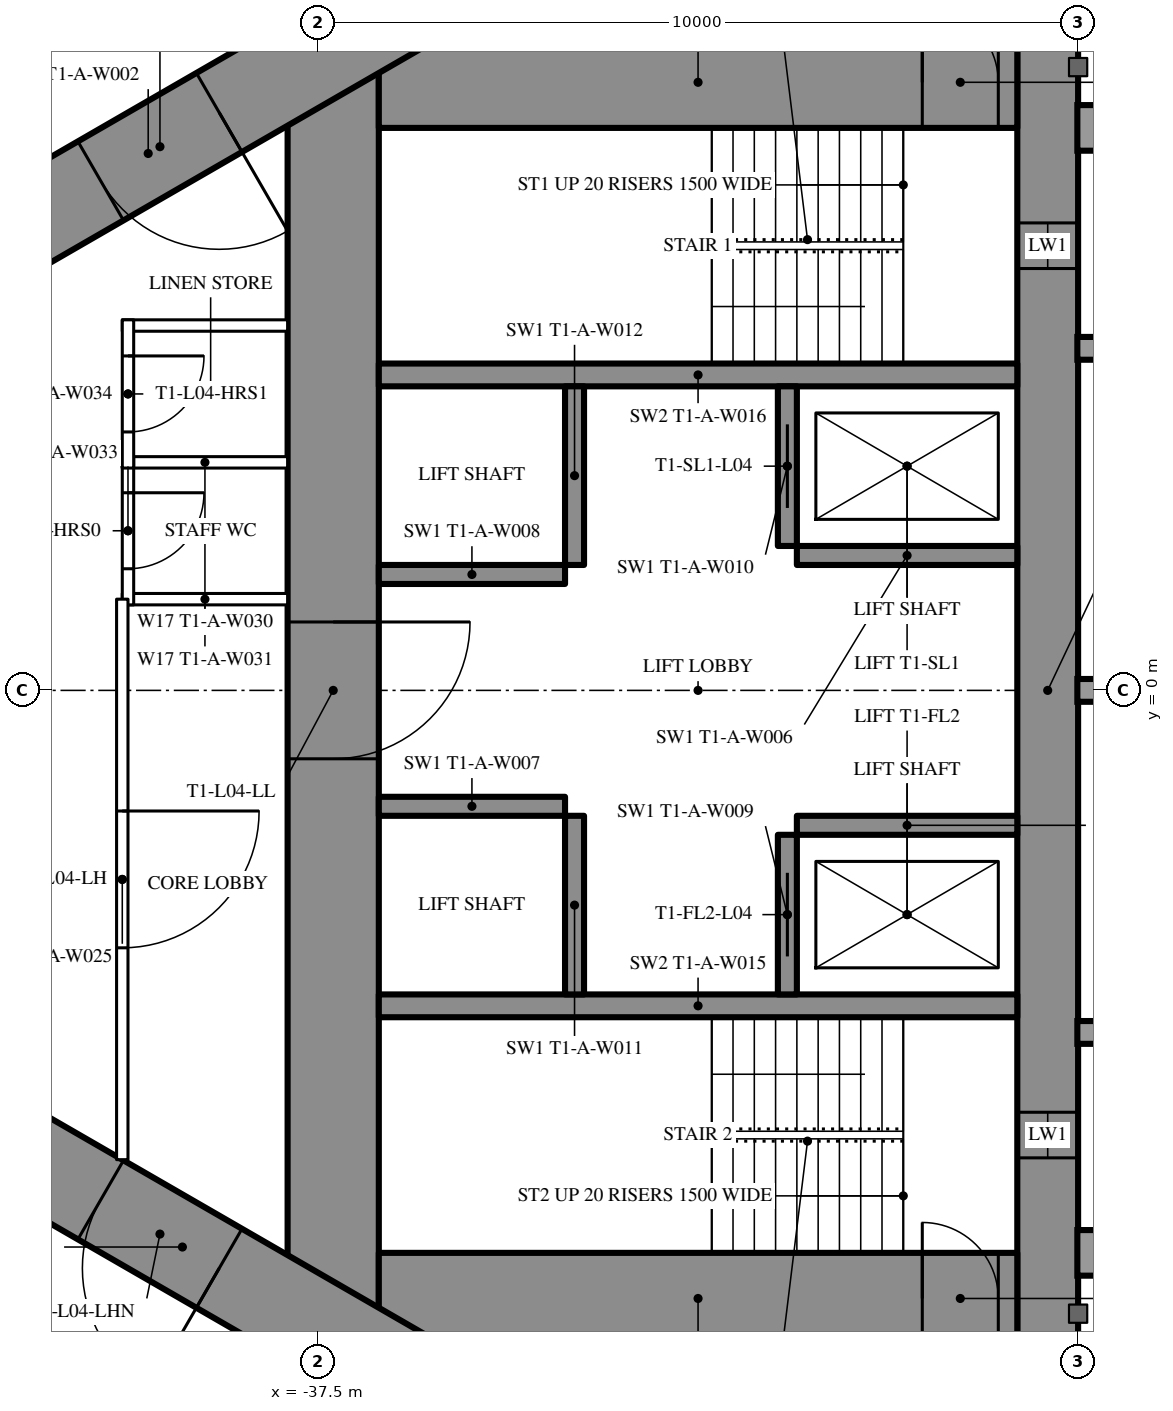
"""IFC4 building model, lengths in metres.
Left out: names, types, materials, properties, quantities, classifications, styles, units other than length and angle.
Written with IfcOpenShell. Run it as: python <this file> out.ifc"""

import sys

from ifc_helpers import new_model, si_unit, direction, frame, frame_2d, origin, place, context, subcontext, project, spatial, rectangle, extrude, element, fill, save


model = new_model("IFC4")
c1 = context("Model", 3, precision=1e-05, world=origin(), true_north=direction((0.0, 1.0)))
c2 = subcontext(c1, "Body", "Model", "MODEL_VIEW")
j1 = project(units=[si_unit("LENGTHUNIT", "METRE"), si_unit("PLANEANGLEUNIT", "RADIAN")], contexts=[c1])
p1 = place(None, origin())
s1 = spatial("IfcSite", under=j1, at=p1, CompositionType="ELEMENT")
p2 = place(p1, origin())
s2 = spatial("IfcBuilding", under=s1, at=p2, CompositionType="ELEMENT")
p3 = place(p2, frame((0.0, 0.0, 21.5)))
s3 = spatial("IfcBuildingStorey", under=s2, at=p3, CompositionType="ELEMENT", Elevation=21.5)
p4 = place(p3, frame((-27.9, 8.6, 0.0), z_axis=(0.0, 0.0, 1.0), x_axis=(0.0, -1.0, 0.0)))
e1 = element("IfcWall", 1, at=p4, inside=s3, PredefinedType="SHEAR", context=c2, shape_type="SweptSolid", body=[
    extrude(rectangle(XDim=17.2, YDim=0.8, at=frame_2d((8.6, 0.0))), origin(), (0.0, 0.0, 1.0), 3.5),
])
p5 = place(p4, frame((2.45, 0.0, 0.6)))
e2 = element("IfcOpeningElement", 2, at=p5, cuts=e1, PredefinedType="OPENING", context=c2, shape_type="SweptSolid", body=[
    extrude(rectangle(XDim=0.6, YDim=2.1, at=frame_2d((0.3, 1.05))), frame((0.0, 0.41, 0.0), z_axis=(0.0, -1.0, 0.0), x_axis=(1.0, 0.0, 0.0)), (0.0, 0.0, 1.0), 0.82),
])
p6 = place(p4, frame((14.15, 0.0, 0.6)))
e3 = element("IfcOpeningElement", 3, at=p6, cuts=e1, PredefinedType="OPENING", context=c2, shape_type="SweptSolid", body=[
    extrude(rectangle(XDim=0.6, YDim=2.1, at=frame_2d((0.3, 1.05))), frame((0.0, 0.41, 0.0), z_axis=(0.0, -1.0, 0.0), x_axis=(1.0, 0.0, 0.0)), (0.0, 0.0, 1.0), 0.82),
])
p7 = place(p3, frame((-37.3, 8.6, 0.0), z_axis=(0.0, 0.0, 1.0), x_axis=(0.0, -1.0, 0.0)))
e4 = element("IfcWall", 4, at=p7, inside=s3, PredefinedType="SHEAR", context=c2, shape_type="SweptSolid", body=[
    extrude(rectangle(XDim=17.2, YDim=1.2, at=frame_2d((8.6, 0.0))), origin(), (0.0, 0.0, 1.0), 3.5),
])
p8 = place(p7, frame((7.7, 0.0, 0.0)))
e5 = element("IfcOpeningElement", 5, at=p8, cuts=e4, PredefinedType="OPENING", context=c2, shape_type="SweptSolid", body=[
    extrude(rectangle(XDim=1.8, YDim=2.2, at=frame_2d((0.9, 1.1))), frame((0.0, 0.61, 0.0), z_axis=(0.0, -1.0, 0.0), x_axis=(1.0, 0.0, 0.0)), (0.0, 0.0, 1.0), 1.22),
])
p9 = place(p3, frame((-28.3, 8.0, 0.0), z_axis=(0.0, 0.0, 1.0), x_axis=(-1.0, 0.0, 0.0)))
e6 = element("IfcWall", 6, at=p9, inside=s3, PredefinedType="SHEAR", context=c2, shape_type="SweptSolid", body=[
    extrude(rectangle(XDim=8.4, YDim=1.2, at=frame_2d((4.2, 0.0))), origin(), (0.0, 0.0, 1.0), 3.5),
])
p10 = place(p9, frame((0.25, 0.0, 0.0)))
e7 = element("IfcOpeningElement", 7, at=p10, cuts=e6, PredefinedType="OPENING", context=c2, shape_type="SweptSolid", body=[
    extrude(rectangle(XDim=1.0, YDim=2.2, at=frame_2d((0.5, 1.1))), frame((0.0, 0.61, 0.0), z_axis=(0.0, -1.0, 0.0), x_axis=(1.0, 0.0, 0.0)), (0.0, 0.0, 1.0), 1.22),
])
p11 = place(p3, frame((-28.3, -8.0, 0.0), z_axis=(0.0, 0.0, 1.0), x_axis=(-1.0, 0.0, 0.0)))
e8 = element("IfcWall", 8, at=p11, inside=s3, PredefinedType="SHEAR", context=c2, shape_type="SweptSolid", body=[
    extrude(rectangle(XDim=8.4, YDim=1.2, at=frame_2d((4.2, 0.0))), origin(), (0.0, 0.0, 1.0), 3.5),
])
p12 = place(p11, frame((0.25, 0.0, 0.0)))
e9 = element("IfcOpeningElement", 9, at=p12, cuts=e8, PredefinedType="OPENING", context=c2, shape_type="SweptSolid", body=[
    extrude(rectangle(XDim=1.0, YDim=2.2, at=frame_2d((0.5, 1.1))), frame((0.0, 0.61, 0.0), z_axis=(0.0, -1.0, 0.0), x_axis=(1.0, 0.0, 0.0)), (0.0, 0.0, 1.0), 1.22),
])
for number, where, z_axis, x_axis in (
    (10, (-28.3, 4.15, 0.0), (0.0, 0.0, 1.0), (-1.0, 0.0, 0.0)),
    (11, (-28.3, -4.15, 0.0), (0.0, 0.0, 1.0), (-1.0, 0.0, 0.0)),
):
    element("IfcWall", number, at=place(p3, frame(where, z_axis=z_axis, x_axis=x_axis)), inside=s3, PredefinedType="SHEAR", context=c2, shape_type="SweptSolid", body=[
        extrude(rectangle(XDim=8.4, YDim=0.3, at=frame_2d((4.2, 0.0))), origin(), (0.0, 0.0, 1.0), 3.5),
    ])
p13 = place(p3, frame((-31.325, 4.0, 0.0), z_axis=(0.0, 0.0, 1.0), x_axis=(0.0, -1.0, 0.0)))
e12 = element("IfcWall", 12, at=p13, inside=s3, PredefinedType="SHEAR", context=c2, shape_type="SweptSolid", body=[
    extrude(rectangle(XDim=2.1, YDim=0.25, at=frame_2d((1.05, 0.0))), origin(), (0.0, 0.0, 1.0), 3.5),
])
p14 = place(p13, frame((0.5, 0.0, 0.0)))
e13 = element("IfcOpeningElement", 13, at=p14, cuts=e12, PredefinedType="OPENING", context=c2, shape_type="SweptSolid", body=[
    extrude(rectangle(XDim=1.1, YDim=2.2, at=frame_2d((0.55, 1.1))), frame((0.0, 0.135, 0.0), z_axis=(0.0, -1.0, 0.0), x_axis=(1.0, 0.0, 0.0)), (0.0, 0.0, 1.0), 0.27),
])
p15 = place(p3, frame((-34.125, 4.0, 0.0), z_axis=(0.0, 0.0, 1.0), x_axis=(0.0, -1.0, 0.0)))
e14 = element("IfcWall", 14, at=p15, inside=s3, PredefinedType="SHEAR", context=c2, shape_type="SweptSolid", body=[
    extrude(rectangle(XDim=2.35, YDim=0.25, at=frame_2d((1.175, 0.0))), origin(), (0.0, 0.0, 1.0), 3.5),
])
p16 = place(p3, frame((-28.3, 1.775, 0.0), z_axis=(0.0, 0.0, 1.0), x_axis=(-1.0, 0.0, 0.0)))
e15 = element("IfcWall", 15, at=p16, inside=s3, PredefinedType="SHEAR", context=c2, shape_type="SweptSolid", body=[
    extrude(rectangle(XDim=2.9, YDim=0.25, at=frame_2d((1.45, 0.0))), origin(), (0.0, 0.0, 1.0), 3.5),
])
p17 = place(p3, frame((-34.25, 1.525, 0.0), z_axis=(0.0, 0.0, 1.0), x_axis=(-1.0, 0.0, 0.0)))
e16 = element("IfcWall", 16, at=p17, inside=s3, PredefinedType="SHEAR", context=c2, shape_type="SweptSolid", body=[
    extrude(rectangle(XDim=2.45, YDim=0.25, at=frame_2d((1.225, 0.0))), origin(), (0.0, 0.0, 1.0), 3.5),
])
p18 = place(p3, frame((-31.325, -1.9, 0.0), z_axis=(0.0, 0.0, 1.0), x_axis=(0.0, -1.0, 0.0)))
e17 = element("IfcWall", 17, at=p18, inside=s3, PredefinedType="SHEAR", context=c2, shape_type="SweptSolid", body=[
    extrude(rectangle(XDim=2.1, YDim=0.25, at=frame_2d((1.05, 0.0))), origin(), (0.0, 0.0, 1.0), 3.5),
])
p19 = place(p18, frame((0.5, 0.0, 0.0)))
e18 = element("IfcOpeningElement", 18, at=p19, cuts=e17, PredefinedType="OPENING", context=c2, shape_type="SweptSolid", body=[
    extrude(rectangle(XDim=1.1, YDim=2.2, at=frame_2d((0.55, 1.1))), frame((0.0, 0.135, 0.0), z_axis=(0.0, -1.0, 0.0), x_axis=(1.0, 0.0, 0.0)), (0.0, 0.0, 1.0), 0.27),
])
p20 = place(p3, frame((-34.125, -1.65, 0.0), z_axis=(0.0, 0.0, 1.0), x_axis=(0.0, -1.0, 0.0)))
e19 = element("IfcWall", 19, at=p20, inside=s3, PredefinedType="SHEAR", context=c2, shape_type="SweptSolid", body=[
    extrude(rectangle(XDim=2.35, YDim=0.25, at=frame_2d((1.175, 0.0))), origin(), (0.0, 0.0, 1.0), 3.5),
])
p21 = place(p3, frame((-28.3, -1.775, 0.0), z_axis=(0.0, 0.0, 1.0), x_axis=(-1.0, 0.0, 0.0)))
e20 = element("IfcWall", 20, at=p21, inside=s3, PredefinedType="SHEAR", context=c2, shape_type="SweptSolid", body=[
    extrude(rectangle(XDim=2.9, YDim=0.25, at=frame_2d((1.45, 0.0))), origin(), (0.0, 0.0, 1.0), 3.5),
])
p22 = place(p3, frame((-34.25, -1.525, 0.0), z_axis=(0.0, 0.0, 1.0), x_axis=(-1.0, 0.0, 0.0)))
e21 = element("IfcWall", 21, at=p22, inside=s3, PredefinedType="SHEAR", context=c2, shape_type="SweptSolid", body=[
    extrude(rectangle(XDim=2.45, YDim=0.25, at=frame_2d((1.225, 0.0))), origin(), (0.0, 0.0, 1.0), 3.5),
])
p23 = place(p3, frame((-27.2, 14.3, 0.0), z_axis=(0.0, 0.0, 1.0), x_axis=(-0.866026593062, -0.499997940104, 0.0)))
e22 = element("IfcWall", 22, at=p23, inside=s3, PredefinedType="SHEAR", context=c2, shape_type="SweptSolid", body=[
    extrude(rectangle(XDim=28.946, YDim=1.2, at=frame_2d((14.473, 0.0))), origin(), (0.0, 0.0, 1.0), 3.5),
])
p24 = place(p23, frame((4.6, 0.0, 0.0)))
e23 = element("IfcOpeningElement", 23, at=p24, cuts=e22, PredefinedType="OPENING", context=c2, shape_type="SweptSolid", body=[
    extrude(rectangle(XDim=1.0, YDim=2.2, at=frame_2d((0.5, 1.1))), frame((0.0, 0.61, 0.0), z_axis=(0.0, -1.0, 0.0), x_axis=(1.0, 0.0, 0.0)), (0.0, 0.0, 1.0), 1.22),
])
p25 = place(p23, frame((13.395, 0.0, 0.0)))
e24 = element("IfcOpeningElement", 24, at=p25, cuts=e22, PredefinedType="OPENING", context=c2, shape_type="SweptSolid", body=[
    extrude(rectangle(XDim=1.8, YDim=2.2, at=frame_2d((0.9, 1.1))), frame((0.0, 0.61, 0.0), z_axis=(0.0, -1.0, 0.0), x_axis=(1.0, 0.0, 0.0)), (0.0, 0.0, 1.0), 1.22),
])
p26 = place(p3, frame((-27.2, -14.3, 0.0), z_axis=(0.0, 0.0, 1.0), x_axis=(-0.866024021859, 0.500002393557, 0.0)))
e25 = element("IfcWall", 25, at=p26, inside=s3, PredefinedType="SHEAR", context=c2, shape_type="SweptSolid", body=[
    extrude(rectangle(XDim=27.907, YDim=1.2, at=frame_2d((13.954, 0.0))), origin(), (0.0, 0.0, 1.0), 3.5),
])
p27 = place(p26, frame((4.6, 0.0, 0.0)))
e26 = element("IfcOpeningElement", 26, at=p27, cuts=e25, PredefinedType="OPENING", context=c2, shape_type="SweptSolid", body=[
    extrude(rectangle(XDim=1.0, YDim=2.2, at=frame_2d((0.5, 1.1))), frame((0.0, 0.61, 0.0), z_axis=(0.0, -1.0, 0.0), x_axis=(1.0, 0.0, 0.0)), (0.0, 0.0, 1.0), 1.22),
])
p28 = place(p26, frame((13.395, 0.0, 0.0)))
e27 = element("IfcOpeningElement", 27, at=p28, cuts=e25, PredefinedType="OPENING", context=c2, shape_type="SweptSolid", body=[
    extrude(rectangle(XDim=1.8, YDim=2.2, at=frame_2d((0.9, 1.1))), frame((0.0, 0.61, 0.0), z_axis=(0.0, -1.0, 0.0), x_axis=(1.0, 0.0, 0.0)), (0.0, 0.0, 1.0), 1.22),
])
p29 = place(p3, frame((-37.7, 10.894, 0.0), z_axis=(0.0, 0.0, 1.0), x_axis=(-0.866027905338, -0.499995667157, 0.0)))
e28 = element("IfcWall", 28, at=p29, inside=s3, PredefinedType="PARTITIONING", context=c2, shape_type="SweptSolid", body=[
    extrude(rectangle(XDim=21.787, YDim=0.2, at=frame_2d((10.894, 0.0))), origin(), (0.0, 0.0, 1.0), 3.25),
])
p30 = place(p29, frame((11.78, 0.0, 0.0)))
e29 = element("IfcOpeningElement", 29, at=p30, cuts=e28, PredefinedType="OPENING", context=c2, shape_type="SweptSolid", body=[
    extrude(rectangle(XDim=0.95, YDim=2.2, at=frame_2d((0.475, 1.1))), frame((0.0, 0.11, 0.0), z_axis=(0.0, -1.0, 0.0), x_axis=(1.0, 0.0, 0.0)), (0.0, 0.0, 1.0), 0.22),
])
p31 = place(p29, frame((7.73, 0.0, 0.0)))
e30 = element("IfcOpeningElement", 30, at=p31, cuts=e28, PredefinedType="OPENING", context=c2, shape_type="SweptSolid", body=[
    extrude(rectangle(XDim=0.95, YDim=2.2, at=frame_2d((0.475, 1.1))), frame((0.0, 0.11, 0.0), z_axis=(0.0, -1.0, 0.0), x_axis=(1.0, 0.0, 0.0)), (0.0, 0.0, 1.0), 0.22),
])
p32 = place(p3, frame((-36.92, -11.344, 0.0), z_axis=(0.0, 0.0, 1.0), x_axis=(-0.866028313256, 0.499994960614, 0.0)))
e31 = element("IfcWall", 31, at=p32, inside=s3, PredefinedType="PARTITIONING", context=c2, shape_type="SweptSolid", body=[
    extrude(rectangle(XDim=22.568, YDim=0.2, at=frame_2d((11.284, 0.0))), origin(), (0.0, 0.0, 1.0), 3.25),
])
p33 = place(p32, frame((15.03, 0.0, 0.0)))
e32 = element("IfcOpeningElement", 32, at=p33, cuts=e31, PredefinedType="OPENING", context=c2, shape_type="SweptSolid", body=[
    extrude(rectangle(XDim=0.95, YDim=2.2, at=frame_2d((0.475, 1.1))), frame((0.0, 0.11, 0.0), z_axis=(0.0, -1.0, 0.0), x_axis=(1.0, 0.0, 0.0)), (0.0, 0.0, 1.0), 0.22),
])
p34 = place(p32, frame((3.35, 0.0, 0.0)))
e33 = element("IfcOpeningElement", 33, at=p34, cuts=e31, PredefinedType="OPENING", context=c2, shape_type="SweptSolid", body=[
    extrude(rectangle(XDim=1.0, YDim=2.2, at=frame_2d((0.5, 1.1))), frame((0.0, 0.11, 0.0), z_axis=(0.0, -1.0, 0.0), x_axis=(1.0, 0.0, 0.0)), (0.0, 0.0, 1.0), 0.22),
])
for number, where, z_axis, x_axis in (
    (34, (-37.9, 1.2, 0.0), (0.0, 0.0, 1.0), (-1.0, 0.0, 0.0)),
    (35, (-37.9, 3.0, 0.0), (0.0, 0.0, 1.0), (-1.0, 0.0, 0.0)),
    (36, (-37.9, 4.8, 0.0), (0.0, 0.0, 1.0), (-1.0, 0.0, 0.0)),
):
    element("IfcWall", number, at=place(p3, frame(where, z_axis=z_axis, x_axis=x_axis)), inside=s3, PredefinedType="PARTITIONING", context=c2, shape_type="SweptSolid", body=[
        extrude(rectangle(XDim=2.175, YDim=0.15, at=frame_2d((1.087, 0.0))), origin(), (0.0, 0.0, 1.0), 3.25),
    ])
p35 = place(p3, frame((-40.0, 3.075, 0.0), z_axis=(0.0, 0.0, 1.0), x_axis=(0.0, -1.0, 0.0)))
e37 = element("IfcWall", 37, at=p35, inside=s3, PredefinedType="PARTITIONING", context=c2, shape_type="SweptSolid", body=[
    extrude(rectangle(XDim=1.95, YDim=0.15, at=frame_2d((0.975, 0.0))), origin(), (0.0, 0.0, 1.0), 3.25),
])
p36 = place(p35, frame((0.475, 0.0, 0.0)))
e38 = element("IfcOpeningElement", 38, at=p36, cuts=e37, PredefinedType="OPENING", context=c2, shape_type="SweptSolid", body=[
    extrude(rectangle(XDim=1.0, YDim=2.2, at=frame_2d((0.5, 1.1))), frame((0.0, 0.085, 0.0), z_axis=(0.0, -1.0, 0.0), x_axis=(1.0, 0.0, 0.0)), (0.0, 0.0, 1.0), 0.17),
])
p37 = place(p3, frame((-40.0, 4.875, 0.0), z_axis=(0.0, 0.0, 1.0), x_axis=(0.0, -1.0, 0.0)))
e39 = element("IfcWall", 39, at=p37, inside=s3, PredefinedType="PARTITIONING", context=c2, shape_type="SweptSolid", body=[
    extrude(rectangle(XDim=1.95, YDim=0.15, at=frame_2d((0.975, 0.0))), origin(), (0.0, 0.0, 1.0), 3.25),
])
p38 = place(p37, frame((0.475, 0.0, 0.0)))
e40 = element("IfcOpeningElement", 40, at=p38, cuts=e39, PredefinedType="OPENING", context=c2, shape_type="SweptSolid", body=[
    extrude(rectangle(XDim=1.0, YDim=2.2, at=frame_2d((0.5, 1.1))), frame((0.0, 0.085, 0.0), z_axis=(0.0, -1.0, 0.0), x_axis=(1.0, 0.0, 0.0)), (0.0, 0.0, 1.0), 0.17),
])
p39 = place(p3, frame((-40.075, 1.2, 0.0), z_axis=(0.0, 0.0, 1.0), x_axis=(0.0, -1.0, 0.0)))
e41 = element("IfcWall", 41, at=p39, inside=s3, PredefinedType="PARTITIONING", context=c2, shape_type="SweptSolid", body=[
    extrude(rectangle(XDim=7.374, YDim=0.15, at=frame_2d((3.687, 0.0))), origin(), (0.0, 0.0, 1.0), 3.25),
])
p40 = place(p39, frame((2.787, 0.0, 0.0)))
e42 = element("IfcOpeningElement", 42, at=p40, cuts=e41, PredefinedType="OPENING", context=c2, shape_type="SweptSolid", body=[
    extrude(rectangle(XDim=1.8, YDim=2.2, at=frame_2d((0.9, 1.1))), frame((0.0, 0.085, 0.0), z_axis=(0.0, -1.0, 0.0), x_axis=(1.0, 0.0, 0.0)), (0.0, 0.0, 1.0), 0.17),
])
p41 = place(p36, origin())
e43 = element("IfcDoor", 43, at=p41, inside=s3, OperationType="SINGLE_SWING_LEFT", PredefinedType="DOOR", context=c2, shape_type="SweptSolid", body=[
    extrude(rectangle(XDim=1.0, YDim=2.2, at=frame_2d((0.5, 1.1))), frame((0.0, 0.025, 0.0), z_axis=(0.0, -1.0, 0.0), x_axis=(1.0, 0.0, 0.0)), (0.0, 0.0, 1.0), 0.05),
])
fill(e38, e43)
p42 = place(p38, origin())
e44 = element("IfcDoor", 44, at=p42, inside=s3, OperationType="SINGLE_SWING_LEFT", PredefinedType="DOOR", context=c2, shape_type="SweptSolid", body=[
    extrude(rectangle(XDim=1.0, YDim=2.2, at=frame_2d((0.5, 1.1))), frame((0.0, 0.025, 0.0), z_axis=(0.0, -1.0, 0.0), x_axis=(1.0, 0.0, 0.0)), (0.0, 0.0, 1.0), 0.05),
])
fill(e40, e44)
p43 = place(p40, origin())
e45 = element("IfcDoor", 45, at=p43, inside=s3, OperationType="DOUBLE_DOOR_SINGLE_SWING", PredefinedType="DOOR", context=c2, shape_type="SweptSolid", body=[
    extrude(rectangle(XDim=1.8, YDim=2.2, at=frame_2d((0.9, 1.1))), frame((0.0, 0.025, 0.0), z_axis=(0.0, -1.0, 0.0), x_axis=(1.0, 0.0, 0.0)), (0.0, 0.0, 1.0), 0.05),
])
fill(e42, e45)
p44 = place(p25, origin())
e46 = element("IfcDoor", 46, at=p44, inside=s3, OperationType="DOUBLE_DOOR_SINGLE_SWING", PredefinedType="DOOR", context=c2, shape_type="SweptSolid", body=[
    extrude(rectangle(XDim=1.8, YDim=2.2, at=frame_2d((0.9, 1.1))), frame((0.0, 0.025, 0.0), z_axis=(0.0, -1.0, 0.0), x_axis=(1.0, 0.0, 0.0)), (0.0, 0.0, 1.0), 0.05),
])
fill(e24, e46)
p45 = place(p28, origin())
e47 = element("IfcDoor", 47, at=p45, inside=s3, OperationType="DOUBLE_DOOR_SINGLE_SWING", PredefinedType="DOOR", context=c2, shape_type="SweptSolid", body=[
    extrude(rectangle(XDim=1.8, YDim=2.2, at=frame_2d((0.9, 1.1))), frame((0.0, 0.025, 0.0), z_axis=(0.0, -1.0, 0.0), x_axis=(1.0, 0.0, 0.0)), (0.0, 0.0, 1.0), 0.05),
])
fill(e27, e47)
p46 = place(p8, origin())
e48 = element("IfcDoor", 48, at=p46, inside=s3, OperationType="DOUBLE_DOOR_SINGLE_SWING", PredefinedType="DOOR", context=c2, shape_type="SweptSolid", body=[
    extrude(rectangle(XDim=1.8, YDim=2.2, at=frame_2d((0.9, 1.1))), frame((0.0, 0.025, 0.0), z_axis=(0.0, -1.0, 0.0), x_axis=(1.0, 0.0, 0.0)), (0.0, 0.0, 1.0), 0.05),
])
fill(e5, e48)
p47 = place(p10, origin())
e49 = element("IfcDoor", 49, at=p47, inside=s3, OperationType="SINGLE_SWING_RIGHT", PredefinedType="DOOR", context=c2, shape_type="SweptSolid", body=[
    extrude(rectangle(XDim=1.0, YDim=2.2, at=frame_2d((0.5, 1.1))), frame((0.0, 0.025, 0.0), z_axis=(0.0, -1.0, 0.0), x_axis=(1.0, 0.0, 0.0)), (0.0, 0.0, 1.0), 0.05),
])
fill(e7, e49)
p48 = place(p12, origin())
e50 = element("IfcDoor", 50, at=p48, inside=s3, OperationType="SINGLE_SWING_RIGHT", PredefinedType="DOOR", context=c2, shape_type="SweptSolid", body=[
    extrude(rectangle(XDim=1.0, YDim=2.2, at=frame_2d((0.5, 1.1))), frame((0.0, 0.025, 0.0), z_axis=(0.0, -1.0, 0.0), x_axis=(1.0, 0.0, 0.0)), (0.0, 0.0, 1.0), 0.05),
])
fill(e9, e50)
p49 = place(p14, origin())
e51 = element("IfcDoor", 51, at=p49, inside=s3, OperationType="SLIDING_TO_LEFT", PredefinedType="USERDEFINED", context=c2, shape_type="SweptSolid", body=[
    extrude(rectangle(XDim=1.1, YDim=2.2, at=frame_2d((0.55, 1.1))), frame((0.0, 0.025, 0.0), z_axis=(0.0, -1.0, 0.0), x_axis=(1.0, 0.0, 0.0)), (0.0, 0.0, 1.0), 0.05),
])
fill(e13, e51)
p50 = place(p19, origin())
e52 = element("IfcDoor", 52, at=p50, inside=s3, OperationType="SLIDING_TO_LEFT", PredefinedType="USERDEFINED", context=c2, shape_type="SweptSolid", body=[
    extrude(rectangle(XDim=1.1, YDim=2.2, at=frame_2d((0.55, 1.1))), frame((0.0, 0.025, 0.0), z_axis=(0.0, -1.0, 0.0), x_axis=(1.0, 0.0, 0.0)), (0.0, 0.0, 1.0), 0.05),
])
fill(e18, e52)
p51 = place(p5, origin())
e53 = element("IfcWindow", 53, at=p51, inside=s3, PartitioningType="SINGLE_PANEL", PredefinedType="WINDOW", context=c2, shape_type="SweptSolid", body=[
    extrude(rectangle(XDim=0.6, YDim=2.1, at=frame_2d((0.3, 1.05))), frame((0.0, 0.03, 0.0), z_axis=(0.0, -1.0, 0.0), x_axis=(1.0, 0.0, 0.0)), (0.0, 0.0, 1.0), 0.06),
])
fill(e2, e53)
p52 = place(p6, origin())
e54 = element("IfcWindow", 54, at=p52, inside=s3, PartitioningType="SINGLE_PANEL", PredefinedType="WINDOW", context=c2, shape_type="SweptSolid", body=[
    extrude(rectangle(XDim=0.6, YDim=2.1, at=frame_2d((0.3, 1.05))), frame((0.0, 0.03, 0.0), z_axis=(0.0, -1.0, 0.0), x_axis=(1.0, 0.0, 0.0)), (0.0, 0.0, 1.0), 0.06),
])
fill(e3, e54)
save(model, sys.argv[1])
